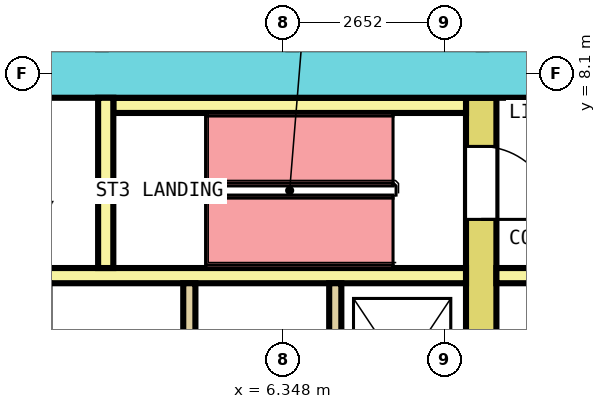
"""IFC4 building model, lengths in metres.
Left out: names, types, materials, properties, quantities, classifications, styles, units other than length and angle.
Written with IfcOpenShell. Run it as: python <this file> out.ifc"""

import sys

from ifc_helpers import new_model, si_unit, direction, frame, frame_2d, origin, place, context, subcontext, project, spatial, rectangle, extrude, element, fill, save


model = new_model("IFC4")
c1 = context("Model", 3, precision=1e-05, world=origin(), true_north=direction((0.0, 1.0)))
c2 = subcontext(c1, "Body", "Model", "MODEL_VIEW")
j1 = project(units=[si_unit("LENGTHUNIT", "METRE"), si_unit("PLANEANGLEUNIT", "RADIAN")], contexts=[c1])
p1 = place(None, origin())
s1 = spatial("IfcSite", under=j1, at=p1, CompositionType="ELEMENT")
p2 = place(p1, origin())
s2 = spatial("IfcBuilding", under=s1, at=p2, CompositionType="ELEMENT")
p3 = place(p2, frame((0.0, 0.0, 14.6)))
s3 = spatial("IfcBuildingStorey", under=s2, at=p3, CompositionType="ELEMENT", Elevation=14.6)
p4 = place(p3, frame((-12.75, 8.1, 0.0), z_axis=(0.0, 0.0, 1.0), x_axis=(1.0, 0.0, 0.0)))
e1 = element("IfcWall", 1, at=p4, inside=s3, PredefinedType="SHEAR", context=c2, shape_type="SweptSolid", body=[
    extrude(rectangle(XDim=25.5, YDim=0.8, at=frame_2d((12.75, 0.0))), origin(), (0.0, 0.0, 1.0), 4.1),
])
p5 = place(p4, frame((13.675, 0.0, 0.0)))
e2 = element("IfcOpeningElement", 2, at=p5, cuts=e1, PredefinedType="OPENING", context=c2, shape_type="SweptSolid", body=[
    extrude(rectangle(XDim=1.4, YDim=2.1, at=frame_2d((0.7, 1.05))), frame((0.0, 0.41, 0.0), z_axis=(0.0, -1.0, 0.0), x_axis=(1.0, 0.0, 0.0)), (0.0, 0.0, 1.0), 0.82),
])
p6 = place(p3, frame((9.6, -7.7, 0.0), z_axis=(0.0, 0.0, 1.0), x_axis=(0.0, 1.0, 0.0)))
e3 = element("IfcWall", 3, at=p6, inside=s3, PredefinedType="SHEAR", context=c2, shape_type="SweptSolid", body=[
    extrude(rectangle(XDim=15.4, YDim=0.5, at=frame_2d((7.7, 0.0))), origin(), (0.0, 0.0, 1.0), 4.1),
])
p7 = place(p6, frame((6.5, 0.0, 0.0)))
e4 = element("IfcOpeningElement", 4, at=p7, cuts=e3, PredefinedType="OPENING", context=c2, shape_type="SweptSolid", body=[
    extrude(rectangle(XDim=2.4, YDim=2.1, at=frame_2d((1.2, 1.05))), frame((0.0, 0.26, 0.0), z_axis=(0.0, -1.0, 0.0), x_axis=(1.0, 0.0, 0.0)), (0.0, 0.0, 1.0), 0.52),
])
p8 = place(p6, frame((13.4, 0.0, 0.0)))
e5 = element("IfcOpeningElement", 5, at=p8, cuts=e3, PredefinedType="OPENING", context=c2, shape_type="SweptSolid", body=[
    extrude(rectangle(XDim=1.2, YDim=2.1, at=frame_2d((0.6, 1.05))), frame((0.0, 0.26, 0.0), z_axis=(0.0, -1.0, 0.0), x_axis=(1.0, 0.0, 0.0)), (0.0, 0.0, 1.0), 0.52),
])
p9 = place(p6, frame((0.9, 0.0, 0.0)))
e6 = element("IfcOpeningElement", 6, at=p9, cuts=e3, PredefinedType="OPENING", context=c2, shape_type="SweptSolid", body=[
    extrude(rectangle(XDim=1.0, YDim=2.1, at=frame_2d((0.5, 1.05))), frame((0.0, 0.26, 0.0), z_axis=(0.0, -1.0, 0.0), x_axis=(1.0, 0.0, 0.0)), (0.0, 0.0, 1.0), 0.52),
])
p10 = place(p3, frame((-9.35, 4.775, 0.0), z_axis=(0.0, 0.0, 1.0), x_axis=(1.0, 0.0, 0.0)))
e7 = element("IfcWall", 7, at=p10, inside=s3, PredefinedType="SOLIDWALL", context=c2, shape_type="SweptSolid", body=[
    extrude(rectangle(XDim=18.7, YDim=0.25, at=frame_2d((9.35, 0.0))), origin(), (0.0, 0.0, 1.0), 4.1),
])
p11 = place(p3, frame((9.85, 4.775, 0.0), z_axis=(0.0, 0.0, 1.0), x_axis=(1.0, 0.0, 0.0)))
e8 = element("IfcWall", 8, at=p11, inside=s3, PredefinedType="SOLIDWALL", context=c2, shape_type="SweptSolid", body=[
    extrude(rectangle(XDim=2.9, YDim=0.25, at=frame_2d((1.45, 0.0))), origin(), (0.0, 0.0, 1.0), 4.1),
])
for number, where, z_axis, x_axis in (
    (9, (4.8, 1.75, 0.0), (0.0, 0.0, 1.0), (0.0, 1.0, 0.0)),
    (10, (7.2, 1.75, 0.0), (0.0, 0.0, 1.0), (0.0, 1.0, 0.0)),
):
    element("IfcWall", number, at=place(p3, frame(where, z_axis=z_axis, x_axis=x_axis)), inside=s3, PredefinedType="SOLIDWALL", context=c2, shape_type="SweptSolid", body=[
        extrude(rectangle(XDim=2.9, YDim=0.2, at=frame_2d((1.45, 0.0))), origin(), (0.0, 0.0, 1.0), 4.1),
    ])
p12 = place(p3, frame((3.55, 7.575, 0.0), z_axis=(0.0, 0.0, 1.0), x_axis=(1.0, 0.0, 0.0)))
e11 = element("IfcWall", 11, at=p12, inside=s3, PredefinedType="SOLIDWALL", context=c2, shape_type="SweptSolid", body=[
    extrude(rectangle(XDim=5.8, YDim=0.25, at=frame_2d((2.9, 0.0))), origin(), (0.0, 0.0, 1.0), 4.1),
])
p13 = place(p3, frame((3.425, 4.9, 0.0), z_axis=(0.0, 0.0, 1.0), x_axis=(0.0, 1.0, 0.0)))
e12 = element("IfcWall", 12, at=p13, inside=s3, PredefinedType="SOLIDWALL", context=c2, shape_type="SweptSolid", body=[
    extrude(rectangle(XDim=2.8, YDim=0.25, at=frame_2d((1.4, 0.0))), origin(), (0.0, 0.0, 1.0), 4.1),
])
p14 = place(p8, origin())
e13 = element("IfcDoor", 13, at=p14, inside=s3, OperationType="SINGLE_SWING_LEFT", PredefinedType="DOOR", context=c2, shape_type="SweptSolid", body=[
    extrude(rectangle(XDim=1.2, YDim=2.1, at=frame_2d((0.6, 1.05))), frame((0.0, 0.2, 0.0), z_axis=(0.0, -1.0, 0.0), x_axis=(1.0, 0.0, 0.0)), (0.0, 0.0, 1.0), 0.4),
])
fill(e5, e13)
save(model, sys.argv[1])
